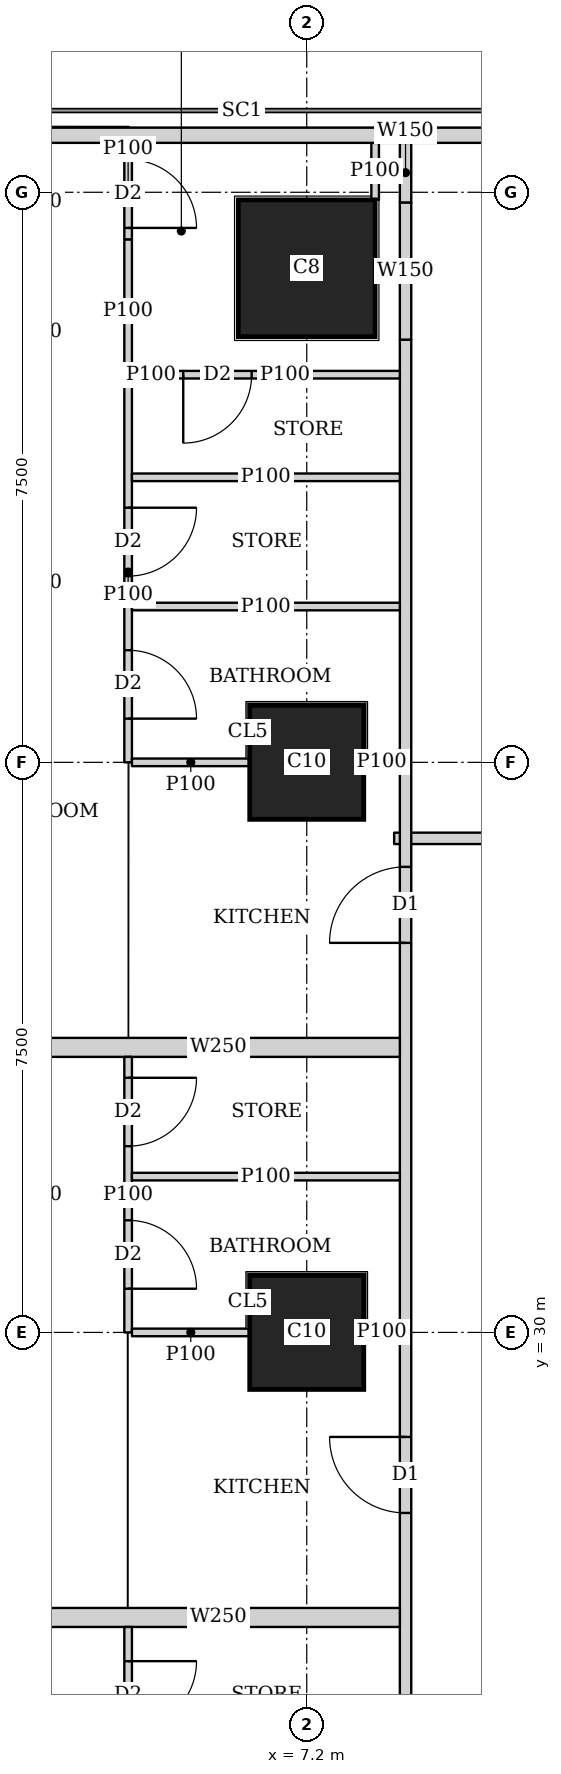
"""IFC4 building model, lengths in metres.
Left out: names, types, materials, properties, quantities, classifications, styles, units other than length and angle.
Written with IfcOpenShell. Run it as: python <this file> out.ifc"""

import sys

from ifc_helpers import new_model, si_unit, direction, frame, frame_2d, origin, origin_2d, place, context, subcontext, project, spatial, rectangle, extrude, element, fill, save


model = new_model("IFC4")
c1 = context("Model", 3, precision=1e-05, world=origin(), true_north=direction((0.0, 1.0)))
c2 = subcontext(c1, "Body", "Model", "MODEL_VIEW")
j1 = project(units=[si_unit("LENGTHUNIT", "METRE"), si_unit("PLANEANGLEUNIT", "RADIAN")], contexts=[c1])
p1 = place(None, origin())
s1 = spatial("IfcSite", under=j1, at=p1, CompositionType="ELEMENT")
p2 = place(p1, origin())
s2 = spatial("IfcBuilding", under=s1, at=p2, CompositionType="ELEMENT")
p3 = place(p2, frame((0.0, 0.0, 135.8)))
s3 = spatial("IfcBuildingStorey", under=s2, at=p3, CompositionType="ELEMENT", Elevation=135.8)
for number, where, z_axis, x_axis in (
    (1, (7.2, 30.0, 0.0), (0.0, 0.0, 1.0), (1.0, 0.0, 0.0)),
    (2, (7.2, 37.5, 0.0), (0.0, 0.0, 1.0), (1.0, 0.0, 0.0)),
):
    element("IfcColumn", number, at=place(p3, frame(where, z_axis=z_axis, x_axis=x_axis)), inside=s3, PredefinedType="COLUMN", context=c2, shape_type="SweptSolid", body=[
        extrude(rectangle(XDim=1.5, YDim=1.5, at=origin_2d()), origin(), (0.0, 0.0, 1.0), 3.75),
    ])
p4 = place(p3, frame((7.2, 44.0, 0.0), z_axis=(0.0, 0.0, 1.0), x_axis=(1.0, 0.0, 0.0)))
e3 = element("IfcColumn", 3, at=p4, inside=s3, PredefinedType="COLUMN", context=c2, shape_type="SweptSolid", body=[
    extrude(rectangle(XDim=1.8, YDim=1.8, at=origin_2d()), origin(), (0.0, 0.0, 1.0), 3.75),
])
p5 = place(p3, frame((40.106, 45.75, 0.0), z_axis=(0.0, 0.0, 1.0), x_axis=(-1.0, 0.0, 0.0)))
e4 = element("IfcWall", 4, at=p5, inside=s3, PredefinedType="SOLIDWALL", context=c2, shape_type="SweptSolid", body=[
    extrude(rectangle(XDim=37.943, YDim=0.2, at=frame_2d((18.971, 0.0))), origin(), (0.0, 0.0, 1.0), 3.5),
])
p6 = place(p5, frame((8.606, 0.0, 0.9)))
e5 = element("IfcOpeningElement", 5, at=p6, cuts=e4, PredefinedType="OPENING", context=c2, shape_type="SweptSolid", body=[
    extrude(rectangle(XDim=1.8, YDim=1.5, at=frame_2d((0.9, 0.75))), frame((0.0, 0.11, 0.0), z_axis=(0.0, -1.0, 0.0), x_axis=(1.0, 0.0, 0.0)), (0.0, 0.0, 1.0), 0.22),
])
p7 = place(p5, frame((12.206, 0.0, 0.9)))
e6 = element("IfcOpeningElement", 6, at=p7, cuts=e4, PredefinedType="OPENING", context=c2, shape_type="SweptSolid", body=[
    extrude(rectangle(XDim=1.8, YDim=1.5, at=frame_2d((0.9, 0.75))), frame((0.0, 0.11, 0.0), z_axis=(0.0, -1.0, 0.0), x_axis=(1.0, 0.0, 0.0)), (0.0, 0.0, 1.0), 0.22),
])
p8 = place(p5, frame((15.806, 0.0, 0.9)))
e7 = element("IfcOpeningElement", 7, at=p8, cuts=e4, PredefinedType="OPENING", context=c2, shape_type="SweptSolid", body=[
    extrude(rectangle(XDim=1.8, YDim=1.5, at=frame_2d((0.9, 0.75))), frame((0.0, 0.11, 0.0), z_axis=(0.0, -1.0, 0.0), x_axis=(1.0, 0.0, 0.0)), (0.0, 0.0, 1.0), 0.22),
])
p9 = place(p5, frame((19.406, 0.0, 0.9)))
e8 = element("IfcOpeningElement", 8, at=p9, cuts=e4, PredefinedType="OPENING", context=c2, shape_type="SweptSolid", body=[
    extrude(rectangle(XDim=1.8, YDim=1.5, at=frame_2d((0.9, 0.75))), frame((0.0, 0.11, 0.0), z_axis=(0.0, -1.0, 0.0), x_axis=(1.0, 0.0, 0.0)), (0.0, 0.0, 1.0), 0.22),
])
p10 = place(p5, frame((23.006, 0.0, 0.9)))
e9 = element("IfcOpeningElement", 9, at=p10, cuts=e4, PredefinedType="OPENING", context=c2, shape_type="SweptSolid", body=[
    extrude(rectangle(XDim=1.8, YDim=1.5, at=frame_2d((0.9, 0.75))), frame((0.0, 0.11, 0.0), z_axis=(0.0, -1.0, 0.0), x_axis=(1.0, 0.0, 0.0)), (0.0, 0.0, 1.0), 0.22),
])
p11 = place(p5, frame((26.606, 0.0, 0.9)))
e10 = element("IfcOpeningElement", 10, at=p11, cuts=e4, PredefinedType="OPENING", context=c2, shape_type="SweptSolid", body=[
    extrude(rectangle(XDim=1.8, YDim=1.5, at=frame_2d((0.9, 0.75))), frame((0.0, 0.11, 0.0), z_axis=(0.0, -1.0, 0.0), x_axis=(1.0, 0.0, 0.0)), (0.0, 0.0, 1.0), 0.22),
])
p12 = place(p3, frame((8.5, 1.964, 0.0), z_axis=(0.0, 0.0, 1.0), x_axis=(0.0, 1.0, 0.0)))
e11 = element("IfcWall", 11, at=p12, inside=s3, PredefinedType="SOLIDWALL", context=c2, shape_type="SweptSolid", body=[
    extrude(rectangle(XDim=41.097, YDim=0.15, at=frame_2d((20.548, 0.0))), origin(), (0.0, 0.0, 1.0), 3.5),
])
p13 = place(p12, frame((6.911, 0.0, 0.0)))
e12 = element("IfcOpeningElement", 12, at=p13, cuts=e11, PredefinedType="OPENING", context=c2, shape_type="SweptSolid", body=[
    extrude(rectangle(XDim=1.0, YDim=2.1, at=frame_2d((0.5, 1.05))), frame((0.0, 0.085, 0.0), z_axis=(0.0, -1.0, 0.0), x_axis=(1.0, 0.0, 0.0)), (0.0, 0.0, 1.0), 0.17),
])
p14 = place(p12, frame((10.661, 0.0, 0.0)))
e13 = element("IfcOpeningElement", 13, at=p14, cuts=e11, PredefinedType="OPENING", context=c2, shape_type="SweptSolid", body=[
    extrude(rectangle(XDim=1.0, YDim=2.1, at=frame_2d((0.5, 1.05))), frame((0.0, 0.085, 0.0), z_axis=(0.0, -1.0, 0.0), x_axis=(1.0, 0.0, 0.0)), (0.0, 0.0, 1.0), 0.17),
])
p15 = place(p12, frame((25.661, 0.0, 0.0)))
e14 = element("IfcOpeningElement", 14, at=p15, cuts=e11, PredefinedType="OPENING", context=c2, shape_type="SweptSolid", body=[
    extrude(rectangle(XDim=1.0, YDim=2.1, at=frame_2d((0.5, 1.05))), frame((0.0, 0.085, 0.0), z_axis=(0.0, -1.0, 0.0), x_axis=(1.0, 0.0, 0.0)), (0.0, 0.0, 1.0), 0.17),
])
p16 = place(p12, frame((33.161, 0.0, 0.0)))
e15 = element("IfcOpeningElement", 15, at=p16, cuts=e11, PredefinedType="OPENING", context=c2, shape_type="SweptSolid", body=[
    extrude(rectangle(XDim=1.0, YDim=2.1, at=frame_2d((0.5, 1.05))), frame((0.0, 0.085, 0.0), z_axis=(0.0, -1.0, 0.0), x_axis=(1.0, 0.0, 0.0)), (0.0, 0.0, 1.0), 0.17),
])
p17 = place(p3, frame((8.5, 43.061, 0.0), z_axis=(0.0, 0.0, 1.0), x_axis=(0.0, 1.0, 0.0)))
e16 = element("IfcWall", 16, at=p17, inside=s3, PredefinedType="SOLIDWALL", context=c2, shape_type="SweptSolid", body=[
    extrude(rectangle(XDim=1.805, YDim=0.15, at=frame_2d((0.902, 0.0))), origin(), (0.0, 0.0, 1.0), 2.1),
])
p18 = place(p3, frame((8.5, 44.866, 0.0), z_axis=(0.0, 0.0, 1.0), x_axis=(0.0, 1.0, 0.0)))
e17 = element("IfcWall", 17, at=p18, inside=s3, PredefinedType="SOLIDWALL", context=c2, shape_type="SweptSolid", body=[
    extrude(rectangle(XDim=0.784, YDim=0.15, at=frame_2d((0.392, 0.0))), origin(), (0.0, 0.0, 1.0), 3.5),
])
p19 = place(p3, frame((8.35, 36.5, 0.0), z_axis=(0.0, 0.0, 1.0), x_axis=(1.0, 0.0, 0.0)))
e18 = element("IfcWall", 18, at=p19, inside=s3, PredefinedType="SOLIDWALL", context=c2, shape_type="SweptSolid", body=[
    extrude(rectangle(XDim=12.249, YDim=0.15, at=frame_2d((6.125, 0.0))), origin(), (0.0, 0.0, 1.0), 3.5),
])
p20 = place(p19, frame((2.6, 0.0, 0.0)))
e19 = element("IfcOpeningElement", 19, at=p20, cuts=e18, PredefinedType="OPENING", context=c2, shape_type="SweptSolid", body=[
    extrude(rectangle(XDim=1.0, YDim=2.1, at=frame_2d((0.5, 1.05))), frame((0.0, 0.085, 0.0), z_axis=(0.0, -1.0, 0.0), x_axis=(1.0, 0.0, 0.0)), (0.0, 0.0, 1.0), 0.17),
])
p21 = place(p19, frame((10.55, 0.0, 0.0)))
e20 = element("IfcOpeningElement", 20, at=p21, cuts=e18, PredefinedType="OPENING", context=c2, shape_type="SweptSolid", body=[
    extrude(rectangle(XDim=1.0, YDim=2.1, at=frame_2d((0.5, 1.05))), frame((0.0, 0.085, 0.0), z_axis=(0.0, -1.0, 0.0), x_axis=(1.0, 0.0, 0.0)), (0.0, 0.0, 1.0), 0.17),
])
p22 = place(p3, frame((8.1, 45.65, 0.0), z_axis=(0.0, 0.0, 1.0), x_axis=(0.0, -1.0, 0.0)))
e21 = element("IfcWall", 21, at=p22, inside=s3, PredefinedType="PARTITIONING", context=c2, shape_type="SweptSolid", body=[
    extrude(rectangle(XDim=0.749, YDim=0.1, at=frame_2d((0.375, 0.0))), origin(), (0.0, 0.0, 1.0), 3.5),
])
p23 = place(p3, frame((4.85, 15.0, 0.0), z_axis=(0.0, 0.0, 1.0), x_axis=(0.0, 1.0, 0.0)))
e22 = element("IfcWall", 22, at=p23, inside=s3, PredefinedType="PARTITIONING", context=c2, shape_type="SweptSolid", body=[
    extrude(rectangle(XDim=11.125, YDim=0.1, at=frame_2d((5.562, 0.0))), origin(), (0.0, 0.0, 1.0), 3.5),
])
p24 = place(p23, frame((0.575, 0.0, 0.0)))
e23 = element("IfcOpeningElement", 23, at=p24, cuts=e22, PredefinedType="OPENING", context=c2, shape_type="SweptSolid", body=[
    extrude(rectangle(XDim=0.9, YDim=2.1, at=frame_2d((0.45, 1.05))), frame((0.0, 0.06, 0.0), z_axis=(0.0, -1.0, 0.0), x_axis=(1.0, 0.0, 0.0)), (0.0, 0.0, 1.0), 0.12),
])
p25 = place(p23, frame((4.1, 0.0, 0.0)))
e24 = element("IfcOpeningElement", 24, at=p25, cuts=e22, PredefinedType="OPENING", context=c2, shape_type="SweptSolid", body=[
    extrude(rectangle(XDim=0.9, YDim=2.1, at=frame_2d((0.45, 1.05))), frame((0.0, 0.06, 0.0), z_axis=(0.0, -1.0, 0.0), x_axis=(1.0, 0.0, 0.0)), (0.0, 0.0, 1.0), 0.12),
])
p26 = place(p23, frame((7.9, 0.0, 0.0)))
e25 = element("IfcOpeningElement", 25, at=p26, cuts=e22, PredefinedType="OPENING", context=c2, shape_type="SweptSolid", body=[
    extrude(rectangle(XDim=0.9, YDim=2.1, at=frame_2d((0.45, 1.05))), frame((0.0, 0.06, 0.0), z_axis=(0.0, -1.0, 0.0), x_axis=(1.0, 0.0, 0.0)), (0.0, 0.0, 1.0), 0.12),
])
p27 = place(p23, frame((2.45, 0.0, 0.0)))
e26 = element("IfcOpeningElement", 26, at=p27, cuts=e22, PredefinedType="OPENING", context=c2, shape_type="SweptSolid", body=[
    extrude(rectangle(XDim=0.9, YDim=2.1, at=frame_2d((0.45, 1.05))), frame((0.0, 0.06, 0.0), z_axis=(0.0, -1.0, 0.0), x_axis=(1.0, 0.0, 0.0)), (0.0, 0.0, 1.0), 0.12),
])
p28 = place(p23, frame((5.975, 0.0, 0.0)))
e27 = element("IfcOpeningElement", 27, at=p28, cuts=e22, PredefinedType="OPENING", context=c2, shape_type="SweptSolid", body=[
    extrude(rectangle(XDim=0.9, YDim=2.1, at=frame_2d((0.45, 1.05))), frame((0.0, 0.06, 0.0), z_axis=(0.0, -1.0, 0.0), x_axis=(1.0, 0.0, 0.0)), (0.0, 0.0, 1.0), 0.12),
])
p29 = place(p23, frame((9.775, 0.0, 0.0)))
e28 = element("IfcOpeningElement", 28, at=p29, cuts=e22, PredefinedType="OPENING", context=c2, shape_type="SweptSolid", body=[
    extrude(rectangle(XDim=0.9, YDim=2.1, at=frame_2d((0.45, 1.05))), frame((0.0, 0.06, 0.0), z_axis=(0.0, -1.0, 0.0), x_axis=(1.0, 0.0, 0.0)), (0.0, 0.0, 1.0), 0.12),
])
p30 = place(p3, frame((4.85, 30.0, 0.0), z_axis=(0.0, 0.0, 1.0), x_axis=(0.0, 1.0, 0.0)))
e29 = element("IfcWall", 29, at=p30, inside=s3, PredefinedType="PARTITIONING", context=c2, shape_type="SweptSolid", body=[
    extrude(rectangle(XDim=3.625, YDim=0.1, at=frame_2d((1.812, 0.0))), origin(), (0.0, 0.0, 1.0), 3.5),
])
p31 = place(p30, frame((0.575, 0.0, 0.0)))
e30 = element("IfcOpeningElement", 30, at=p31, cuts=e29, PredefinedType="OPENING", context=c2, shape_type="SweptSolid", body=[
    extrude(rectangle(XDim=0.9, YDim=2.1, at=frame_2d((0.45, 1.05))), frame((0.0, 0.06, 0.0), z_axis=(0.0, -1.0, 0.0), x_axis=(1.0, 0.0, 0.0)), (0.0, 0.0, 1.0), 0.12),
])
p32 = place(p30, frame((2.45, 0.0, 0.0)))
e31 = element("IfcOpeningElement", 31, at=p32, cuts=e29, PredefinedType="OPENING", context=c2, shape_type="SweptSolid", body=[
    extrude(rectangle(XDim=0.9, YDim=2.1, at=frame_2d((0.45, 1.05))), frame((0.0, 0.06, 0.0), z_axis=(0.0, -1.0, 0.0), x_axis=(1.0, 0.0, 0.0)), (0.0, 0.0, 1.0), 0.12),
])
p33 = place(p3, frame((4.9, 30.0, 0.0), z_axis=(0.0, 0.0, 1.0), x_axis=(1.0, 0.0, 0.0)))
e32 = element("IfcWall", 32, at=p33, inside=s3, PredefinedType="PARTITIONING", context=c2, shape_type="SweptSolid", body=[
    extrude(rectangle(XDim=1.549, YDim=0.1, at=frame_2d((0.774, 0.0))), origin(), (0.0, 0.0, 1.0), 3.5),
])
p34 = place(p3, frame((7.951, 30.0, 0.0), z_axis=(0.0, 0.0, 1.0), x_axis=(1.0, 0.0, 0.0)))
e33 = element("IfcWall", 33, at=p34, inside=s3, PredefinedType="PARTITIONING", context=c2, shape_type="SweptSolid", body=[
    extrude(rectangle(XDim=0.474, YDim=0.1, at=frame_2d((0.237, 0.0))), origin(), (0.0, 0.0, 1.0), 3.5),
])
p35 = place(p3, frame((4.9, 32.05, 0.0), z_axis=(0.0, 0.0, 1.0), x_axis=(1.0, 0.0, 0.0)))
e34 = element("IfcWall", 34, at=p35, inside=s3, PredefinedType="PARTITIONING", context=c2, shape_type="SweptSolid", body=[
    extrude(rectangle(XDim=3.525, YDim=0.1, at=frame_2d((1.763, 0.0))), origin(), (0.0, 0.0, 1.0), 3.5),
])
p36 = place(p3, frame((3.65, 26.25, 0.0), z_axis=(0.0, 0.0, 1.0), x_axis=(1.0, 0.0, 0.0)))
e35 = element("IfcWall", 35, at=p36, inside=s3, PredefinedType="SOLIDWALL", context=c2, shape_type="SweptSolid", body=[
    extrude(rectangle(XDim=4.775, YDim=0.25, at=frame_2d((2.388, 0.0))), origin(), (0.0, 0.0, 1.0), 3.5),
])
p37 = place(p3, frame((4.85, 37.5, 0.0), z_axis=(0.0, 0.0, 1.0), x_axis=(0.0, 1.0, 0.0)))
e36 = element("IfcWall", 36, at=p37, inside=s3, PredefinedType="PARTITIONING", context=c2, shape_type="SweptSolid", body=[
    extrude(rectangle(XDim=5.007, YDim=0.1, at=frame_2d((2.503, 0.0))), origin(), (0.0, 0.0, 1.0), 3.5),
])
p38 = place(p37, frame((0.575, 0.0, 0.0)))
e37 = element("IfcOpeningElement", 37, at=p38, cuts=e36, PredefinedType="OPENING", context=c2, shape_type="SweptSolid", body=[
    extrude(rectangle(XDim=0.9, YDim=2.1, at=frame_2d((0.45, 1.05))), frame((0.0, 0.06, 0.0), z_axis=(0.0, -1.0, 0.0), x_axis=(1.0, 0.0, 0.0)), (0.0, 0.0, 1.0), 0.12),
])
p39 = place(p37, frame((2.45, 0.0, 0.0)))
e38 = element("IfcOpeningElement", 38, at=p39, cuts=e36, PredefinedType="OPENING", context=c2, shape_type="SweptSolid", body=[
    extrude(rectangle(XDim=0.9, YDim=2.1, at=frame_2d((0.45, 1.05))), frame((0.0, 0.06, 0.0), z_axis=(0.0, -1.0, 0.0), x_axis=(1.0, 0.0, 0.0)), (0.0, 0.0, 1.0), 0.12),
])
p40 = place(p3, frame((4.85, 42.507, 0.0), z_axis=(0.0, 0.0, 1.0), x_axis=(0.0, 1.0, 0.0)))
e39 = element("IfcWall", 39, at=p40, inside=s3, PredefinedType="PARTITIONING", context=c2, shape_type="SweptSolid", body=[
    extrude(rectangle(XDim=1.874, YDim=0.1, at=frame_2d((0.937, 0.0))), origin(), (0.0, 0.0, 1.0), 2.1),
])
p41 = place(p3, frame((4.85, 44.381, 0.0), z_axis=(0.0, 0.0, 1.0), x_axis=(0.0, 1.0, 0.0)))
e40 = element("IfcWall", 40, at=p41, inside=s3, PredefinedType="PARTITIONING", context=c2, shape_type="SweptSolid", body=[
    extrude(rectangle(XDim=1.269, YDim=0.1, at=frame_2d((0.634, 0.0))), origin(), (0.0, 0.0, 1.0), 3.5),
])
p42 = place(p41, frame((0.15, 0.0, 0.0)))
e41 = element("IfcOpeningElement", 41, at=p42, cuts=e40, PredefinedType="OPENING", context=c2, shape_type="SweptSolid", body=[
    extrude(rectangle(XDim=0.9, YDim=2.1, at=frame_2d((0.45, 1.05))), frame((0.0, 0.06, 0.0), z_axis=(0.0, -1.0, 0.0), x_axis=(1.0, 0.0, 0.0)), (0.0, 0.0, 1.0), 0.12),
])
p43 = place(p3, frame((4.9, 37.5, 0.0), z_axis=(0.0, 0.0, 1.0), x_axis=(1.0, 0.0, 0.0)))
e42 = element("IfcWall", 42, at=p43, inside=s3, PredefinedType="PARTITIONING", context=c2, shape_type="SweptSolid", body=[
    extrude(rectangle(XDim=1.549, YDim=0.1, at=frame_2d((0.774, 0.0))), origin(), (0.0, 0.0, 1.0), 3.5),
])
p44 = place(p3, frame((7.951, 37.5, 0.0), z_axis=(0.0, 0.0, 1.0), x_axis=(1.0, 0.0, 0.0)))
e43 = element("IfcWall", 43, at=p44, inside=s3, PredefinedType="PARTITIONING", context=c2, shape_type="SweptSolid", body=[
    extrude(rectangle(XDim=0.474, YDim=0.1, at=frame_2d((0.237, 0.0))), origin(), (0.0, 0.0, 1.0), 3.5),
])
for number, where, z_axis, x_axis in (
    (44, (4.9, 41.25, 0.0), (0.0, 0.0, 1.0), (1.0, 0.0, 0.0)),
    (45, (4.9, 39.55, 0.0), (0.0, 0.0, 1.0), (1.0, 0.0, 0.0)),
):
    element("IfcWall", number, at=place(p3, frame(where, z_axis=z_axis, x_axis=x_axis)), inside=s3, PredefinedType="PARTITIONING", context=c2, shape_type="SweptSolid", body=[
        extrude(rectangle(XDim=3.525, YDim=0.1, at=frame_2d((1.763, 0.0))), origin(), (0.0, 0.0, 1.0), 3.5),
    ])
p45 = place(p3, frame((3.65, 33.75, 0.0), z_axis=(0.0, 0.0, 1.0), x_axis=(1.0, 0.0, 0.0)))
e46 = element("IfcWall", 46, at=p45, inside=s3, PredefinedType="SOLIDWALL", context=c2, shape_type="SweptSolid", body=[
    extrude(rectangle(XDim=4.775, YDim=0.25, at=frame_2d((2.388, 0.0))), origin(), (0.0, 0.0, 1.0), 3.5),
])
p46 = place(p3, frame((8.425, 42.6, 0.0), z_axis=(0.0, 0.0, 1.0), x_axis=(-1.0, 0.0, 0.0)))
e47 = element("IfcWall", 47, at=p46, inside=s3, PredefinedType="PARTITIONING", context=c2, shape_type="SweptSolid", body=[
    extrude(rectangle(XDim=3.022, YDim=0.1, at=frame_2d((1.511, 0.0))), origin(), (0.0, 0.0, 1.0), 3.5),
])
p47 = place(p46, frame((1.95, 0.0, 0.0)))
e48 = element("IfcOpeningElement", 48, at=p47, cuts=e47, PredefinedType="OPENING", context=c2, shape_type="SweptSolid", body=[
    extrude(rectangle(XDim=0.9, YDim=2.1, at=frame_2d((0.45, 1.05))), frame((0.0, 0.06, 0.0), z_axis=(0.0, -1.0, 0.0), x_axis=(1.0, 0.0, 0.0)), (0.0, 0.0, 1.0), 0.12),
])
p48 = place(p3, frame((5.403, 42.6, 0.0), z_axis=(0.0, 0.0, 1.0), x_axis=(-1.0, 0.0, 0.0)))
e49 = element("IfcWall", 49, at=p48, inside=s3, PredefinedType="PARTITIONING", context=c2, shape_type="SweptSolid", body=[
    extrude(rectangle(XDim=0.503, YDim=0.1, at=frame_2d((0.251, 0.0))), origin(), (0.0, 0.0, 1.0), 2.1),
])
p49 = place(p29, origin())
e50 = element("IfcDoor", 50, at=p49, inside=s3, OperationType="SINGLE_SWING_LEFT", PredefinedType="DOOR", context=c2, shape_type="SweptSolid", body=[
    extrude(rectangle(XDim=0.9, YDim=2.1, at=frame_2d((0.45, 1.05))), frame((0.0, 0.025, 0.0), z_axis=(0.0, -1.0, 0.0), x_axis=(1.0, 0.0, 0.0)), (0.0, 0.0, 1.0), 0.05),
])
fill(e28, e50)
p50 = place(p31, origin())
e51 = element("IfcDoor", 51, at=p50, inside=s3, OperationType="SINGLE_SWING_RIGHT", PredefinedType="DOOR", context=c2, shape_type="SweptSolid", body=[
    extrude(rectangle(XDim=0.9, YDim=2.1, at=frame_2d((0.45, 1.05))), frame((0.0, 0.025, 0.0), z_axis=(0.0, -1.0, 0.0), x_axis=(1.0, 0.0, 0.0)), (0.0, 0.0, 1.0), 0.05),
])
fill(e30, e51)
p51 = place(p32, origin())
e52 = element("IfcDoor", 52, at=p51, inside=s3, OperationType="SINGLE_SWING_LEFT", PredefinedType="DOOR", context=c2, shape_type="SweptSolid", body=[
    extrude(rectangle(XDim=0.9, YDim=2.1, at=frame_2d((0.45, 1.05))), frame((0.0, 0.025, 0.0), z_axis=(0.0, -1.0, 0.0), x_axis=(1.0, 0.0, 0.0)), (0.0, 0.0, 1.0), 0.05),
])
fill(e31, e52)
p52 = place(p15, origin())
e53 = element("IfcDoor", 53, at=p52, inside=s3, OperationType="SINGLE_SWING_RIGHT", PredefinedType="DOOR", context=c2, shape_type="SweptSolid", body=[
    extrude(rectangle(XDim=1.0, YDim=2.1, at=frame_2d((0.5, 1.05))), frame((0.0, 0.025, 0.0), z_axis=(0.0, -1.0, 0.0), x_axis=(1.0, 0.0, 0.0)), (0.0, 0.0, 1.0), 0.05),
])
fill(e14, e53)
p53 = place(p38, origin())
e54 = element("IfcDoor", 54, at=p53, inside=s3, OperationType="SINGLE_SWING_RIGHT", PredefinedType="DOOR", context=c2, shape_type="SweptSolid", body=[
    extrude(rectangle(XDim=0.9, YDim=2.1, at=frame_2d((0.45, 1.05))), frame((0.0, 0.025, 0.0), z_axis=(0.0, -1.0, 0.0), x_axis=(1.0, 0.0, 0.0)), (0.0, 0.0, 1.0), 0.05),
])
fill(e37, e54)
p54 = place(p42, origin())
e55 = element("IfcDoor", 55, at=p54, inside=s3, OperationType="SINGLE_SWING_RIGHT", PredefinedType="DOOR", context=c2, shape_type="SweptSolid", body=[
    extrude(rectangle(XDim=0.9, YDim=2.1, at=frame_2d((0.45, 1.05))), frame((0.0, 0.025, 0.0), z_axis=(0.0, -1.0, 0.0), x_axis=(1.0, 0.0, 0.0)), (0.0, 0.0, 1.0), 0.05),
])
fill(e41, e55)
p55 = place(p39, origin())
e56 = element("IfcDoor", 56, at=p55, inside=s3, OperationType="SINGLE_SWING_LEFT", PredefinedType="DOOR", context=c2, shape_type="SweptSolid", body=[
    extrude(rectangle(XDim=0.9, YDim=2.1, at=frame_2d((0.45, 1.05))), frame((0.0, 0.025, 0.0), z_axis=(0.0, -1.0, 0.0), x_axis=(1.0, 0.0, 0.0)), (0.0, 0.0, 1.0), 0.05),
])
fill(e38, e56)
p56 = place(p16, origin())
e57 = element("IfcDoor", 57, at=p56, inside=s3, OperationType="SINGLE_SWING_LEFT", PredefinedType="DOOR", context=c2, shape_type="SweptSolid", body=[
    extrude(rectangle(XDim=1.0, YDim=2.1, at=frame_2d((0.5, 1.05))), frame((0.0, 0.025, 0.0), z_axis=(0.0, -1.0, 0.0), x_axis=(1.0, 0.0, 0.0)), (0.0, 0.0, 1.0), 0.05),
])
fill(e15, e57)
p57 = place(p47, origin())
e58 = element("IfcDoor", 58, at=p57, inside=s3, OperationType="SINGLE_SWING_RIGHT", PredefinedType="DOOR", context=c2, shape_type="SweptSolid", body=[
    extrude(rectangle(XDim=0.9, YDim=2.1, at=frame_2d((0.45, 1.05))), frame((0.0, 0.025, 0.0), z_axis=(0.0, -1.0, 0.0), x_axis=(1.0, 0.0, 0.0)), (0.0, 0.0, 1.0), 0.05),
])
fill(e48, e58)
save(model, sys.argv[1])
